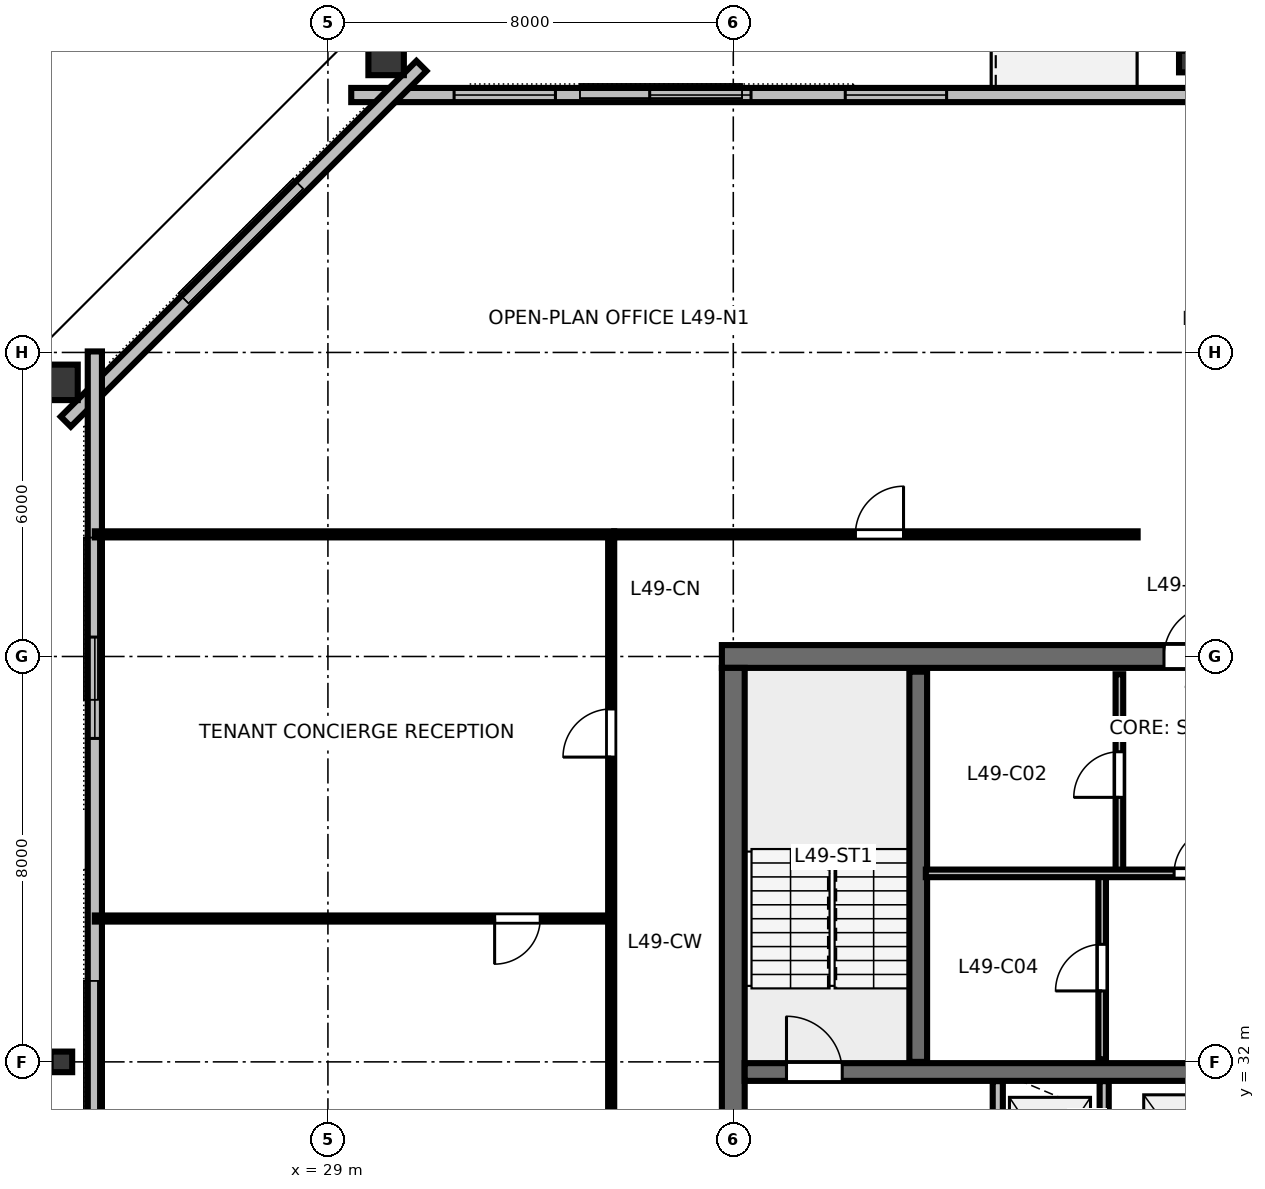
"""IFC4 building model, lengths in metres.
Left out: names, types, materials, properties, quantities, classifications, styles, units other than length and angle.
Written with IfcOpenShell. Run it as: python <this file> out.ifc"""

import sys

from ifc_helpers import new_model, si_unit, direction, frame, frame_2d, origin, origin_2d, place, context, subcontext, project, spatial, rectangle, hollow_rectangle, i_section, extrude, element, fill, save


model = new_model("IFC4")
c1 = context("Model", 3, precision=1e-05, world=origin(), true_north=direction((0.0, 1.0)))
c2 = subcontext(c1, "Body", "Model", "MODEL_VIEW")
j1 = project(units=[si_unit("LENGTHUNIT", "METRE"), si_unit("PLANEANGLEUNIT", "RADIAN")], contexts=[c1])
p1 = place(None, origin())
s1 = spatial("IfcSite", under=j1, at=p1, CompositionType="ELEMENT")
p2 = place(p1, origin())
s2 = spatial("IfcBuilding", under=s1, at=p2, CompositionType="ELEMENT")
p3 = place(p2, frame((0.0, 0.0, 187.8)))
s3 = spatial("IfcBuildingStorey", under=s2, at=p3, CompositionType="ELEMENT", Elevation=187.8)
p4 = place(p3, frame((36.775, 40.0, 0.0), z_axis=(0.0, 0.0, 1.0), x_axis=(1.0, 0.0, 0.0)))
e1 = element("IfcWall", 1, at=p4, inside=s3, PredefinedType="SHEAR", context=c2, shape_type="SweptSolid", body=[
    extrude(rectangle(XDim=18.45, YDim=0.45, at=frame_2d((9.225, 0.0))), origin(), (0.0, 0.0, 1.0), 3.36),
])
p5 = place(p4, frame((8.725, 0.0, 0.0)))
e2 = element("IfcOpeningElement", 2, at=p5, cuts=e1, PredefinedType="OPENING", context=c2, shape_type="SweptSolid", body=[
    extrude(rectangle(XDim=1.0, YDim=2.15, at=frame_2d((0.5, 1.075))), frame((0.0, 0.235, 0.0), z_axis=(0.0, -1.0, 0.0), x_axis=(1.0, 0.0, 0.0)), (0.0, 0.0, 1.0), 0.47),
])
p6 = place(p3, frame((37.0, 24.225, 0.0), z_axis=(0.0, 0.0, 1.0), x_axis=(0.0, 1.0, 0.0)))
e3 = element("IfcWall", 3, at=p6, inside=s3, PredefinedType="SHEAR", context=c2, shape_type="SweptSolid", body=[
    extrude(rectangle(XDim=15.55, YDim=0.45, at=frame_2d((7.775, 0.0))), origin(), (0.0, 0.0, 1.0), 3.36),
])
p7 = place(p6, frame((5.3, 0.0, 0.0)))
e4 = element("IfcOpeningElement", 4, at=p7, cuts=e3, PredefinedType="OPENING", context=c2, shape_type="SweptSolid", body=[
    extrude(rectangle(XDim=1.15, YDim=2.15, at=frame_2d((0.575, 1.075))), frame((0.0, 0.235, 0.0), z_axis=(0.0, -1.0, 0.0), x_axis=(1.0, 0.0, 0.0)), (0.0, 0.0, 1.0), 0.47),
])
p8 = place(p3, frame((37.225, 31.8, 0.0), z_axis=(0.0, 0.0, 1.0), x_axis=(1.0, 0.0, 0.0)))
e5 = element("IfcWall", 5, at=p8, inside=s3, PredefinedType="SHEAR", context=c2, shape_type="SweptSolid", body=[
    extrude(rectangle(XDim=17.55, YDim=0.35, at=frame_2d((8.775, 0.0))), origin(), (0.0, 0.0, 1.0), 3.36),
])
p9 = place(p8, frame((0.825, 0.0, 0.0)))
e6 = element("IfcOpeningElement", 6, at=p9, cuts=e5, PredefinedType="OPENING", context=c2, shape_type="SweptSolid", body=[
    extrude(rectangle(XDim=1.1, YDim=2.15, at=frame_2d((0.55, 1.075))), frame((0.0, 0.185, 0.0), z_axis=(0.0, -1.0, 0.0), x_axis=(1.0, 0.0, 0.0)), (0.0, 0.0, 1.0), 0.37),
])
p10 = place(p8, frame((14.725, 0.0, 0.0)))
e7 = element("IfcOpeningElement", 7, at=p10, cuts=e5, PredefinedType="OPENING", context=c2, shape_type="SweptSolid", body=[
    extrude(rectangle(XDim=1.1, YDim=2.15, at=frame_2d((0.55, 1.075))), frame((0.0, 0.185, 0.0), z_axis=(0.0, -1.0, 0.0), x_axis=(1.0, 0.0, 0.0)), (0.0, 0.0, 1.0), 0.37),
])
p11 = place(p3, frame((46.0, 51.74, 0.0), z_axis=(0.0, 0.0, 1.0), x_axis=(1.0, 0.0, 0.0)))
e8 = element("IfcColumn", 8, at=p11, inside=s3, PredefinedType="COLUMN", context=c2, shape_type="SweptSolid", body=[
    extrude(i_section(OverallWidth=0.406, OverallDepth=0.425, WebThickness=0.033, FlangeThickness=0.052, FilletRadius=0.025, at=origin_2d()), origin(), (0.0, 0.0, 1.0), 3.373),
])
for number, where, z_axis, x_axis in (
    (9, (30.149, 51.897, 0.0), (0.0, 0.0, 1.0), (1.0, 0.0, 0.0)),
    (10, (23.637, 45.41, 0.0), (0.0, 0.0, 1.0), (0.0, 1.0, 0.0)),
):
    element("IfcColumn", number, at=place(p3, frame(where, z_axis=z_axis, x_axis=x_axis)), inside=s3, PredefinedType="COLUMN", context=c2, shape_type="SweptSolid", body=[
        extrude(hollow_rectangle(XDim=0.7, YDim=0.85, WallThickness=0.04, at=origin_2d()), origin(), (0.0, 0.0, 1.0), 3.373),
    ])
p12 = place(p3, frame((23.74, 32.0, 0.0), z_axis=(0.0, 0.0, 1.0), x_axis=(0.0, 1.0, 0.0)))
e11 = element("IfcColumn", 11, at=p12, inside=s3, PredefinedType="COLUMN", context=c2, shape_type="SweptSolid", body=[
    extrude(i_section(OverallWidth=0.406, OverallDepth=0.425, WebThickness=0.033, FlangeThickness=0.052, FilletRadius=0.025, at=origin_2d()), origin(), (0.0, 0.0, 1.0), 3.373),
])
p13 = place(p3, frame((62.54, 51.08, 0.0), z_axis=(0.0, 0.0, 1.0), x_axis=(-1.0, 0.0, 0.0)))
e12 = element("IfcWall", 12, at=p13, inside=s3, PredefinedType="STANDARD", context=c2, shape_type="SweptSolid", body=[
    extrude(rectangle(XDim=33.08, YDim=0.28, at=frame_2d((16.54, 0.0))), origin(), (0.0, 0.0, 1.0), 3.375),
])
p14 = place(p13, frame((12.86, 0.0, 0.0)))
e13 = element("IfcOpeningElement", 13, at=p14, cuts=e12, PredefinedType="OPENING", context=c2, shape_type="SweptSolid", body=[
    extrude(rectangle(XDim=1.4, YDim=2.15, at=frame_2d((0.7, 1.075))), frame((0.0, 0.15, 0.0), z_axis=(0.0, -1.0, 0.0), x_axis=(1.0, 0.0, 0.0)), (0.0, 0.0, 1.0), 0.3),
])
p15 = place(p13, frame((2.03, 0.0, 0.8)))
e14 = element("IfcOpeningElement", 14, at=p15, cuts=e12, PredefinedType="OPENING", context=c2, shape_type="SweptSolid", body=[
    extrude(rectangle(XDim=2.0, YDim=1.95, at=frame_2d((1.0, 0.975))), frame((0.0, 0.15, 0.0), z_axis=(0.0, -1.0, 0.0), x_axis=(1.0, 0.0, 0.0)), (0.0, 0.0, 1.0), 0.3),
])
p16 = place(p13, frame((5.89, 0.0, 0.8)))
e15 = element("IfcOpeningElement", 15, at=p16, cuts=e12, PredefinedType="OPENING", context=c2, shape_type="SweptSolid", body=[
    extrude(rectangle(XDim=2.0, YDim=1.95, at=frame_2d((1.0, 0.975))), frame((0.0, 0.15, 0.0), z_axis=(0.0, -1.0, 0.0), x_axis=(1.0, 0.0, 0.0)), (0.0, 0.0, 1.0), 0.3),
])
p17 = place(p13, frame((9.75, 0.0, 0.8)))
e16 = element("IfcOpeningElement", 16, at=p17, cuts=e12, PredefinedType="OPENING", context=c2, shape_type="SweptSolid", body=[
    extrude(rectangle(XDim=2.0, YDim=1.95, at=frame_2d((1.0, 0.975))), frame((0.0, 0.15, 0.0), z_axis=(0.0, -1.0, 0.0), x_axis=(1.0, 0.0, 0.0)), (0.0, 0.0, 1.0), 0.3),
])
p18 = place(p13, frame((21.33, 0.0, 0.8)))
e17 = element("IfcOpeningElement", 17, at=p18, cuts=e12, PredefinedType="OPENING", context=c2, shape_type="SweptSolid", body=[
    extrude(rectangle(XDim=2.0, YDim=1.95, at=frame_2d((1.0, 0.975))), frame((0.0, 0.15, 0.0), z_axis=(0.0, -1.0, 0.0), x_axis=(1.0, 0.0, 0.0)), (0.0, 0.0, 1.0), 0.3),
])
p19 = place(p13, frame((25.19, 0.0, 0.8)))
e18 = element("IfcOpeningElement", 18, at=p19, cuts=e12, PredefinedType="OPENING", context=c2, shape_type="SweptSolid", body=[
    extrude(rectangle(XDim=2.0, YDim=1.95, at=frame_2d((1.0, 0.975))), frame((0.0, 0.15, 0.0), z_axis=(0.0, -1.0, 0.0), x_axis=(1.0, 0.0, 0.0)), (0.0, 0.0, 1.0), 0.3),
])
p20 = place(p13, frame((29.05, 0.0, 0.8)))
e19 = element("IfcOpeningElement", 19, at=p20, cuts=e12, PredefinedType="OPENING", context=c2, shape_type="SweptSolid", body=[
    extrude(rectangle(XDim=2.0, YDim=1.95, at=frame_2d((1.0, 0.975))), frame((0.0, 0.15, 0.0), z_axis=(0.0, -1.0, 0.0), x_axis=(1.0, 0.0, 0.0)), (0.0, 0.0, 1.0), 0.3),
])
p21 = place(p3, frame((30.845, 51.654, 0.0), z_axis=(0.0, 0.0, 1.0), x_axis=(-0.707106781187, -0.707106781187, 0.0)))
e20 = element("IfcWall", 20, at=p21, inside=s3, PredefinedType="STANDARD", context=c2, shape_type="SweptSolid", body=[
    extrude(rectangle(XDim=9.927, YDim=0.28, at=frame_2d((4.963, 0.0))), origin(), (0.0, 0.0, 1.0), 3.375),
])
p22 = place(p3, frame((24.4, 46.02, 0.0), z_axis=(0.0, 0.0, 1.0), x_axis=(0.0, -1.0, 0.0)))
e21 = element("IfcWall", 21, at=p22, inside=s3, PredefinedType="STANDARD", context=c2, shape_type="SweptSolid", body=[
    extrude(rectangle(XDim=28.04, YDim=0.28, at=frame_2d((14.02, 0.0))), origin(), (0.0, 0.0, 1.0), 3.375),
])
p23 = place(p22, frame((5.637, 0.0, 0.8)))
e22 = element("IfcOpeningElement", 22, at=p23, cuts=e21, PredefinedType="OPENING", context=c2, shape_type="SweptSolid", body=[
    extrude(rectangle(XDim=2.0, YDim=1.95, at=frame_2d((1.0, 0.975))), frame((0.0, 0.15, 0.0), z_axis=(0.0, -1.0, 0.0), x_axis=(1.0, 0.0, 0.0)), (0.0, 0.0, 1.0), 0.3),
])
p24 = place(p22, frame((16.711, 0.0, 0.8)))
e23 = element("IfcOpeningElement", 23, at=p24, cuts=e21, PredefinedType="OPENING", context=c2, shape_type="SweptSolid", body=[
    extrude(rectangle(XDim=2.0, YDim=1.95, at=frame_2d((1.0, 0.975))), frame((0.0, 0.15, 0.0), z_axis=(0.0, -1.0, 0.0), x_axis=(1.0, 0.0, 0.0)), (0.0, 0.0, 1.0), 0.3),
])
p25 = place(p22, frame((20.403, 0.0, 0.8)))
e24 = element("IfcOpeningElement", 24, at=p25, cuts=e21, PredefinedType="OPENING", context=c2, shape_type="SweptSolid", body=[
    extrude(rectangle(XDim=2.0, YDim=1.95, at=frame_2d((1.0, 0.975))), frame((0.0, 0.15, 0.0), z_axis=(0.0, -1.0, 0.0), x_axis=(1.0, 0.0, 0.0)), (0.0, 0.0, 1.0), 0.3),
])
p26 = place(p3, frame((40.65, 32.0, 0.0), z_axis=(0.0, 0.0, 1.0), x_axis=(0.0, 1.0, 0.0)))
e25 = element("IfcWall", 25, at=p26, inside=s3, PredefinedType="SHEAR", context=c2, shape_type="SweptSolid", body=[
    extrude(rectangle(XDim=7.7, YDim=0.35, at=frame_2d((3.85, 0.0))), origin(), (0.0, 0.0, 1.0), 3.6),
])
p27 = place(p3, frame((44.62, 35.72, 0.0), z_axis=(0.0, 0.0, 1.0), x_axis=(0.0, 1.0, 0.0)))
e26 = element("IfcWall", 26, at=p27, inside=s3, PredefinedType="PARTITIONING", context=c2, shape_type="SweptSolid", body=[
    extrude(rectangle(XDim=3.93, YDim=0.15, at=frame_2d((1.965, 0.0))), origin(), (0.0, 0.0, 1.0), 3.375),
])
p28 = place(p27, frame((1.5, 0.0, 0.0)))
e27 = element("IfcOpeningElement", 27, at=p28, cuts=e26, PredefinedType="OPENING", context=c2, shape_type="SweptSolid", body=[
    extrude(rectangle(XDim=0.9, YDim=2.15, at=frame_2d((0.45, 1.075))), frame((0.0, 0.085, 0.0), z_axis=(0.0, -1.0, 0.0), x_axis=(1.0, 0.0, 0.0)), (0.0, 0.0, 1.0), 0.17),
])
p29 = place(p3, frame((44.28, 32.05, 0.0), z_axis=(0.0, 0.0, 1.0), x_axis=(0.0, 1.0, 0.0)))
e28 = element("IfcWall", 28, at=p29, inside=s3, PredefinedType="PARTITIONING", context=c2, shape_type="SweptSolid", body=[
    extrude(rectangle(XDim=3.67, YDim=0.15, at=frame_2d((1.835, 0.0))), origin(), (0.0, 0.0, 1.0), 3.375),
])
p30 = place(p29, frame((1.35, 0.0, 0.0)))
e29 = element("IfcOpeningElement", 29, at=p30, cuts=e28, PredefinedType="OPENING", context=c2, shape_type="SweptSolid", body=[
    extrude(rectangle(XDim=0.92, YDim=2.15, at=frame_2d((0.46, 1.075))), frame((0.0, 0.085, 0.0), z_axis=(0.0, -1.0, 0.0), x_axis=(1.0, 0.0, 0.0)), (0.0, 0.0, 1.0), 0.17),
])
p31 = place(p3, frame((40.8, 35.72, 0.0), z_axis=(0.0, 0.0, 1.0), x_axis=(1.0, 0.0, 0.0)))
e30 = element("IfcWall", 30, at=p31, inside=s3, PredefinedType="PARTITIONING", context=c2, shape_type="SweptSolid", body=[
    extrude(rectangle(XDim=10.4, YDim=0.15, at=frame_2d((5.2, 0.0))), origin(), (0.0, 0.0, 1.0), 3.375),
])
p32 = place(p31, frame((4.9, 0.0, 0.0)))
e31 = element("IfcOpeningElement", 31, at=p32, cuts=e30, PredefinedType="OPENING", context=c2, shape_type="SweptSolid", body=[
    extrude(rectangle(XDim=0.9, YDim=2.15, at=frame_2d((0.45, 1.075))), frame((0.0, 0.085, 0.0), z_axis=(0.0, -1.0, 0.0), x_axis=(1.0, 0.0, 0.0)), (0.0, 0.0, 1.0), 0.17),
])
p33 = place(p3, frame((42.22, 28.58, 0.0), z_axis=(0.0, 0.0, 1.0), x_axis=(0.0, 1.0, 0.0)))
e32 = element("IfcWall", 32, at=p33, inside=s3, PredefinedType="PARTITIONING", context=c2, shape_type="SweptSolid", body=[
    extrude(rectangle(XDim=3.04, YDim=0.2, at=frame_2d((1.52, 0.0))), origin(), (0.0, 0.0, 1.0), 3.375),
])
p34 = place(p33, frame((0.95, 0.0, 0.0)))
e33 = element("IfcOpeningElement", 33, at=p34, cuts=e32, PredefinedType="OPENING", context=c2, shape_type="SweptSolid", body=[
    extrude(rectangle(XDim=1.05, YDim=2.15, at=frame_2d((0.525, 1.075))), frame((0.0, 0.11, 0.0), z_axis=(0.0, -1.0, 0.0), x_axis=(1.0, 0.0, 0.0)), (0.0, 0.0, 1.0), 0.22),
])
p35 = place(p3, frame((44.32, 28.58, 0.0), z_axis=(0.0, 0.0, 1.0), x_axis=(0.0, 1.0, 0.0)))
e34 = element("IfcWall", 34, at=p35, inside=s3, PredefinedType="PARTITIONING", context=c2, shape_type="SweptSolid", body=[
    extrude(rectangle(XDim=3.04, YDim=0.18, at=frame_2d((1.52, 0.0))), origin(), (0.0, 0.0, 1.0), 3.375),
])
p36 = place(p3, frame((34.65, 42.41, 0.0), z_axis=(0.0, 0.0, 1.0), x_axis=(1.0, 0.0, 0.0)))
e35 = element("IfcWall", 35, at=p36, inside=s3, PredefinedType="PARTITIONING", context=c2, shape_type="SweptSolid", body=[
    extrude(rectangle(XDim=10.33, YDim=0.12, at=frame_2d((5.165, 0.0))), origin(), (0.0, 0.0, 1.0), 2.655),
])
p37 = place(p36, frame((4.76, 0.0, 0.0)))
e36 = element("IfcOpeningElement", 36, at=p37, cuts=e35, PredefinedType="OPENING", context=c2, shape_type="SweptSolid", body=[
    extrude(rectangle(XDim=0.95, YDim=2.15, at=frame_2d((0.475, 1.075))), frame((0.0, 0.07, 0.0), z_axis=(0.0, -1.0, 0.0), x_axis=(1.0, 0.0, 0.0)), (0.0, 0.0, 1.0), 0.14),
])
p38 = place(p3, frame((34.59, 34.829, 0.0), z_axis=(0.0, 0.0, 1.0), x_axis=(-1.0, 0.0, 0.0)))
e37 = element("IfcWall", 37, at=p38, inside=s3, PredefinedType="PARTITIONING", context=c2, shape_type="SweptSolid", body=[
    extrude(rectangle(XDim=10.19, YDim=0.12, at=frame_2d((5.095, 0.0))), origin(), (0.0, 0.0, 1.0), 2.655),
])
p39 = place(p38, frame((1.4, 0.0, 0.0)))
e38 = element("IfcOpeningElement", 38, at=p39, cuts=e37, PredefinedType="OPENING", context=c2, shape_type="SweptSolid", body=[
    extrude(rectangle(XDim=0.9, YDim=2.15, at=frame_2d((0.45, 1.075))), frame((0.0, 0.07, 0.0), z_axis=(0.0, -1.0, 0.0), x_axis=(1.0, 0.0, 0.0)), (0.0, 0.0, 1.0), 0.14),
])
p40 = place(p3, frame((34.59, 21.65, 0.0), z_axis=(0.0, 0.0, 1.0), x_axis=(0.0, 1.0, 0.0)))
e39 = element("IfcWall", 39, at=p40, inside=s3, PredefinedType="PARTITIONING", context=c2, shape_type="SweptSolid", body=[
    extrude(rectangle(XDim=20.7, YDim=0.12, at=frame_2d((10.35, 0.0))), origin(), (0.0, 0.0, 1.0), 2.655),
])
p41 = place(p40, frame((6.214, 0.0, 0.0)))
e40 = element("IfcOpeningElement", 40, at=p41, cuts=e39, PredefinedType="OPENING", context=c2, shape_type="SweptSolid", body=[
    extrude(rectangle(XDim=0.95, YDim=2.15, at=frame_2d((0.475, 1.075))), frame((0.0, 0.07, 0.0), z_axis=(0.0, -1.0, 0.0), x_axis=(1.0, 0.0, 0.0)), (0.0, 0.0, 1.0), 0.14),
])
p42 = place(p40, frame((16.365, 0.0, 0.0)))
e41 = element("IfcOpeningElement", 41, at=p42, cuts=e39, PredefinedType="OPENING", context=c2, shape_type="SweptSolid", body=[
    extrude(rectangle(XDim=0.95, YDim=2.15, at=frame_2d((0.475, 1.075))), frame((0.0, 0.07, 0.0), z_axis=(0.0, -1.0, 0.0), x_axis=(1.0, 0.0, 0.0)), (0.0, 0.0, 1.0), 0.14),
])
p43 = place(p3, frame((34.65, 42.41, 0.0), z_axis=(0.0, 0.0, 1.0), x_axis=(-1.0, 0.0, 0.0)))
e42 = element("IfcWall", 42, at=p43, inside=s3, PredefinedType="PARTITIONING", context=c2, shape_type="SweptSolid", body=[
    extrude(rectangle(XDim=10.25, YDim=0.12, at=frame_2d((5.125, 0.0))), origin(), (0.0, 0.0, 1.0), 2.655),
])
p44 = place(p18, origin())
e43 = element("IfcWindow", 43, at=p44, inside=s3, PartitioningType="SINGLE_PANEL", PredefinedType="WINDOW", context=c2, shape_type="SweptSolid", body=[
    extrude(rectangle(XDim=2.0, YDim=1.95, at=frame_2d((1.0, 0.975))), frame((0.0, 0.03, 0.0), z_axis=(0.0, -1.0, 0.0), x_axis=(1.0, 0.0, 0.0)), (0.0, 0.0, 1.0), 0.06),
])
fill(e17, e43)
p45 = place(p19, origin())
e44 = element("IfcWindow", 44, at=p45, inside=s3, PartitioningType="SINGLE_PANEL", PredefinedType="WINDOW", context=c2, shape_type="SweptSolid", body=[
    extrude(rectangle(XDim=2.0, YDim=1.95, at=frame_2d((1.0, 0.975))), frame((0.0, 0.03, 0.0), z_axis=(0.0, -1.0, 0.0), x_axis=(1.0, 0.0, 0.0)), (0.0, 0.0, 1.0), 0.06),
])
fill(e18, e44)
p46 = place(p20, origin())
e45 = element("IfcWindow", 45, at=p46, inside=s3, PartitioningType="SINGLE_PANEL", PredefinedType="WINDOW", context=c2, shape_type="SweptSolid", body=[
    extrude(rectangle(XDim=2.0, YDim=1.95, at=frame_2d((1.0, 0.975))), frame((0.0, 0.03, 0.0), z_axis=(0.0, -1.0, 0.0), x_axis=(1.0, 0.0, 0.0)), (0.0, 0.0, 1.0), 0.06),
])
fill(e19, e45)
p47 = place(p23, origin())
e46 = element("IfcWindow", 46, at=p47, inside=s3, PartitioningType="SINGLE_PANEL", PredefinedType="WINDOW", context=c2, shape_type="SweptSolid", body=[
    extrude(rectangle(XDim=2.0, YDim=1.95, at=frame_2d((1.0, 0.975))), frame((0.0, 0.03, 0.0), z_axis=(0.0, -1.0, 0.0), x_axis=(1.0, 0.0, 0.0)), (0.0, 0.0, 1.0), 0.06),
])
fill(e22, e46)
p48 = place(p9, origin())
e47 = element("IfcDoor", 47, at=p48, inside=s3, OperationType="SINGLE_SWING_LEFT", PredefinedType="DOOR", context=c2, shape_type="SweptSolid", body=[
    extrude(rectangle(XDim=1.1, YDim=2.15, at=frame_2d((0.55, 1.075))), frame((0.0, 0.025, 0.0), z_axis=(0.0, -1.0, 0.0), x_axis=(1.0, 0.0, 0.0)), (0.0, 0.0, 1.0), 0.05),
])
fill(e6, e47)
p49 = place(p5, origin())
e48 = element("IfcDoor", 48, at=p49, inside=s3, OperationType="SINGLE_SWING_RIGHT", PredefinedType="DOOR", context=c2, shape_type="SweptSolid", body=[
    extrude(rectangle(XDim=1.0, YDim=2.15, at=frame_2d((0.5, 1.075))), frame((0.0, 0.025, 0.0), z_axis=(0.0, -1.0, 0.0), x_axis=(1.0, 0.0, 0.0)), (0.0, 0.0, 1.0), 0.05),
])
fill(e2, e48)
p50 = place(p28, origin())
e49 = element("IfcDoor", 49, at=p50, inside=s3, OperationType="SINGLE_SWING_LEFT", PredefinedType="DOOR", context=c2, shape_type="SweptSolid", body=[
    extrude(rectangle(XDim=0.9, YDim=2.15, at=frame_2d((0.45, 1.075))), frame((0.0, 0.025, 0.0), z_axis=(0.0, -1.0, 0.0), x_axis=(1.0, 0.0, 0.0)), (0.0, 0.0, 1.0), 0.05),
])
fill(e27, e49)
p51 = place(p30, origin())
e50 = element("IfcDoor", 50, at=p51, inside=s3, OperationType="SINGLE_SWING_LEFT", PredefinedType="DOOR", context=c2, shape_type="SweptSolid", body=[
    extrude(rectangle(XDim=0.92, YDim=2.15, at=frame_2d((0.46, 1.075))), frame((0.0, 0.025, 0.0), z_axis=(0.0, -1.0, 0.0), x_axis=(1.0, 0.0, 0.0)), (0.0, 0.0, 1.0), 0.05),
])
fill(e29, e50)
p52 = place(p32, origin())
e51 = element("IfcDoor", 51, at=p52, inside=s3, OperationType="SINGLE_SWING_RIGHT", PredefinedType="DOOR", context=c2, shape_type="SweptSolid", body=[
    extrude(rectangle(XDim=0.9, YDim=2.15, at=frame_2d((0.45, 1.075))), frame((0.0, 0.025, 0.0), z_axis=(0.0, -1.0, 0.0), x_axis=(1.0, 0.0, 0.0)), (0.0, 0.0, 1.0), 0.05),
])
fill(e31, e51)
p53 = place(p37, origin())
e52 = element("IfcDoor", 52, at=p53, inside=s3, OperationType="SINGLE_SWING_RIGHT", PredefinedType="DOOR", context=c2, shape_type="SweptSolid", body=[
    extrude(rectangle(XDim=0.95, YDim=2.15, at=frame_2d((0.475, 1.075))), frame((0.0, 0.025, 0.0), z_axis=(0.0, -1.0, 0.0), x_axis=(1.0, 0.0, 0.0)), (0.0, 0.0, 1.0), 0.05),
])
fill(e36, e52)
p54 = place(p39, origin())
e53 = element("IfcDoor", 53, at=p54, inside=s3, OperationType="SINGLE_SWING_RIGHT", PredefinedType="DOOR", context=c2, shape_type="SweptSolid", body=[
    extrude(rectangle(XDim=0.9, YDim=2.15, at=frame_2d((0.45, 1.075))), frame((0.0, 0.025, 0.0), z_axis=(0.0, -1.0, 0.0), x_axis=(1.0, 0.0, 0.0)), (0.0, 0.0, 1.0), 0.05),
])
fill(e38, e53)
p55 = place(p42, origin())
e54 = element("IfcDoor", 54, at=p55, inside=s3, OperationType="SINGLE_SWING_LEFT", PredefinedType="DOOR", context=c2, shape_type="SweptSolid", body=[
    extrude(rectangle(XDim=0.95, YDim=2.15, at=frame_2d((0.475, 1.075))), frame((0.0, 0.025, 0.0), z_axis=(0.0, -1.0, 0.0), x_axis=(1.0, 0.0, 0.0)), (0.0, 0.0, 1.0), 0.05),
])
fill(e41, e54)
save(model, sys.argv[1])
